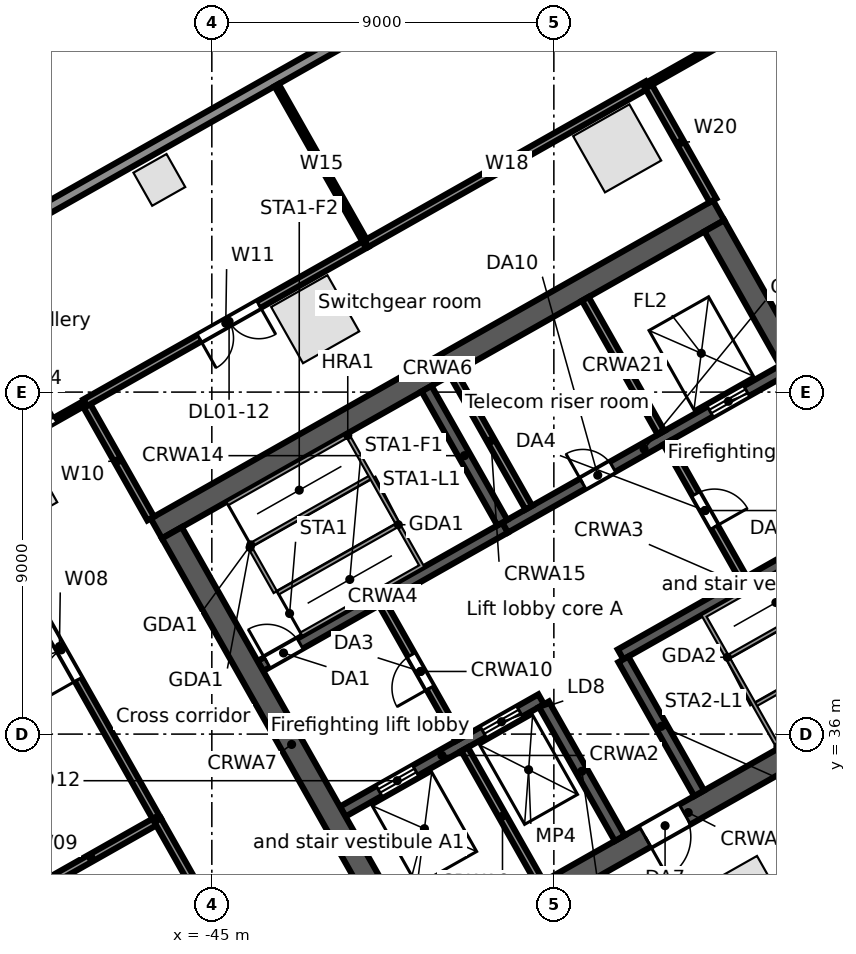
"""IFC4 building model, lengths in metres.
Left out: names, types, materials, properties, quantities, classifications, styles, units other than length and angle.
Written with IfcOpenShell. Run it as: python <this file> out.ifc"""

import sys

from ifc_helpers import new_model, si_unit, direction, frame, frame_2d, origin, origin_2d, place, context, subcontext, project, spatial, rectangle, extrude, element, fill, save


model = new_model("IFC4")
c1 = context("Model", 3, precision=1e-05, world=origin(), true_north=direction((0.0, 1.0)))
c2 = subcontext(c1, "Body", "Model", "MODEL_VIEW")
j1 = project(units=[si_unit("LENGTHUNIT", "METRE"), si_unit("PLANEANGLEUNIT", "RADIAN")], contexts=[c1])
p1 = place(None, origin())
s1 = spatial("IfcSite", under=j1, at=p1, CompositionType="ELEMENT")
p2 = place(p1, origin())
s2 = spatial("IfcBuilding", under=s1, at=p2, CompositionType="ELEMENT")
p3 = place(p2, frame((0.0, 0.0, 6.5)))
s3 = spatial("IfcBuildingStorey", under=s2, at=p3, CompositionType="ELEMENT", Elevation=6.5)
for number, where, z_axis, x_axis in (
    (1, (-34.334, 51.414, 0.0), (0.0, 0.0, 1.0), (-0.87, -0.492, 0.0)),
    (2, (-42.28, 46.919, 0.0), (0.0, 0.0, 1.0), (-0.87, -0.492, 0.0)),
    (3, (-50.226, 42.423, 0.0), (0.0, 0.0, 1.0), (-0.87, -0.492, 0.0)),
    (4, (-30.976, 31.635, 0.0), (0.0, 0.0, 1.0), (0.87, 0.492, 0.0)),
):
    element("IfcColumn", number, at=place(p3, frame(where, z_axis=z_axis, x_axis=x_axis)), inside=s3, PredefinedType="COLUMN", context=c2, shape_type="SweptSolid", body=[
        extrude(rectangle(XDim=1.7, YDim=1.7, at=origin_2d()), origin(), (0.0, 0.0, 1.0), 5.0),
    ])
p4 = place(p3, frame((-46.381, 50.584, 0.0), z_axis=(0.0, 0.0, 1.0), x_axis=(-0.87035569594, -0.492423560103, 0.0)))
e5 = element("IfcColumn", 5, at=p4, inside=s3, PredefinedType="COLUMN", context=c2, shape_type="SweptSolid", body=[
    extrude(rectangle(XDim=1.0, YDim=1.0, at=origin_2d()), origin(), (0.0, 0.0, 1.0), 5.0),
])
p5 = place(p3, frame((-63.707, 41.701, 0.0), z_axis=(0.0, 0.0, 1.0), x_axis=(0.870355510268, 0.492423888277, 0.0)))
e6 = element("IfcWall", 6, at=p5, inside=s3, PredefinedType="STANDARD", context=c2, shape_type="SweptSolid", body=[
    extrude(rectangle(XDim=67.903, YDim=0.3, at=frame_2d((33.952, 0.0))), origin(), (0.0, 0.0, 1.0), 4.65),
])
p6 = place(p3, frame((-45.526, 21.522, 0.0), z_axis=(0.0, 0.0, 1.0), x_axis=(-0.857164837164, 0.515042174903, 0.0)))
e7 = element("IfcWall", 7, at=p6, inside=s3, PredefinedType="STANDARD", context=c2, shape_type="SweptSolid", body=[
    extrude(rectangle(XDim=21.35, YDim=0.3, at=frame_2d((10.675, 0.0))), origin(), (0.0, 0.0, 1.0), 4.65),
])
p7 = place(p3, frame((-39.862, 29.749, 0.0), z_axis=(0.0, 0.0, 1.0), x_axis=(0.870350116061, 0.492433422375, 0.0)))
e8 = element("IfcWall", 8, at=p7, inside=s3, PredefinedType="SOLIDWALL", context=c2, shape_type="SweptSolid", body=[
    extrude(rectangle(XDim=17.0, YDim=0.6, at=frame_2d((8.5, 0.0))), origin(), (0.0, 0.0, 1.0), 4.65),
])
p8 = place(p7, frame((7.2, 0.0, 0.0)))
e9 = element("IfcOpeningElement", 9, at=p8, cuts=e8, PredefinedType="OPENING", context=c2, shape_type="SweptSolid", body=[
    extrude(rectangle(XDim=1.2, YDim=2.1, at=frame_2d((0.6, 1.05))), frame((0.0, 0.31, 0.0), z_axis=(0.0, -1.0, 0.0), x_axis=(1.0, 0.0, 0.0)), (0.0, 0.0, 1.0), 0.62),
])
p9 = place(p3, frame((-41.556, 33.961, 0.0), z_axis=(0.0, 0.0, 1.0), x_axis=(0.870343731308, 0.492444706919, 0.0)))
e10 = element("IfcWall", 10, at=p9, inside=s3, PredefinedType="SOLIDWALL", context=c2, shape_type="SweptSolid", body=[
    extrude(rectangle(XDim=6.0, YDim=0.3, at=frame_2d((3.0, 0.0))), origin(), (0.0, 0.0, 1.0), 4.65),
])
p10 = place(p9, frame((1.1, 0.0, 0.0)))
e11 = element("IfcOpeningElement", 11, at=p10, cuts=e10, PredefinedType="OPENING", context=c2, shape_type="SweptSolid", body=[
    extrude(rectangle(XDim=1.1, YDim=2.1, at=frame_2d((0.55, 1.05))), frame((0.0, 0.16, 0.0), z_axis=(0.0, -1.0, 0.0), x_axis=(1.0, 0.0, 0.0)), (0.0, 0.0, 1.0), 0.32),
])
p11 = place(p9, frame((4.25, 0.0, 0.0)))
e12 = element("IfcOpeningElement", 12, at=p11, cuts=e10, PredefinedType="OPENING", context=c2, shape_type="SweptSolid", body=[
    extrude(rectangle(XDim=1.1, YDim=2.1, at=frame_2d((0.55, 1.05))), frame((0.0, 0.16, 0.0), z_axis=(0.0, -1.0, 0.0), x_axis=(1.0, 0.0, 0.0)), (0.0, 0.0, 1.0), 0.32),
])
p12 = place(p3, frame((-34.245, 38.097, 0.0), z_axis=(0.0, 0.0, 1.0), x_axis=(0.870364910201, 0.492407273597, 0.0)))
e13 = element("IfcWall", 13, at=p12, inside=s3, PredefinedType="SOLIDWALL", context=c2, shape_type="SweptSolid", body=[
    extrude(rectangle(XDim=7.4, YDim=0.3, at=frame_2d((3.7, 0.0))), origin(), (0.0, 0.0, 1.0), 4.65),
])
p13 = place(p12, frame((6.2, 0.0, 0.0)))
e14 = element("IfcOpeningElement", 14, at=p13, cuts=e13, PredefinedType="OPENING", context=c2, shape_type="SweptSolid", body=[
    extrude(rectangle(XDim=1.0, YDim=2.1, at=frame_2d((0.5, 1.05))), frame((0.0, 0.16, 0.0), z_axis=(0.0, -1.0, 0.0), x_axis=(1.0, 0.0, 0.0)), (0.0, 0.0, 1.0), 0.32),
])
p14 = place(p3, frame((-43.723, 37.791, 0.0), z_axis=(0.0, 0.0, 1.0), x_axis=(0.87035077051, 0.49243226567, 0.0)))
e15 = element("IfcWall", 15, at=p14, inside=s3, PredefinedType="SOLIDWALL", context=c2, shape_type="SweptSolid", body=[
    extrude(rectangle(XDim=7.4, YDim=0.3, at=frame_2d((3.7, 0.0))), origin(), (0.0, 0.0, 1.0), 4.65),
])
p15 = place(p14, frame((0.2, 0.0, 0.0)))
e16 = element("IfcOpeningElement", 16, at=p15, cuts=e15, PredefinedType="OPENING", context=c2, shape_type="SweptSolid", body=[
    extrude(rectangle(XDim=1.0, YDim=2.1, at=frame_2d((0.5, 1.05))), frame((0.0, 0.16, 0.0), z_axis=(0.0, -1.0, 0.0), x_axis=(1.0, 0.0, 0.0)), (0.0, 0.0, 1.0), 0.32),
])
p16 = place(p3, frame((-37.282, 41.435, 0.0), z_axis=(0.0, 0.0, 1.0), x_axis=(0.870356516133, 0.492422110414, 0.0)))
e17 = element("IfcWall", 17, at=p16, inside=s3, PredefinedType="SOLIDWALL", context=c2, shape_type="SweptSolid", body=[
    extrude(rectangle(XDim=8.4, YDim=0.3, at=frame_2d((4.2, 0.0))), origin(), (0.0, 0.0, 1.0), 4.65),
])
p17 = place(p16, frame((6.2, 0.0, 0.0)))
e18 = element("IfcOpeningElement", 18, at=p17, cuts=e17, PredefinedType="OPENING", context=c2, shape_type="SweptSolid", body=[
    extrude(rectangle(XDim=1.1, YDim=2.1, at=frame_2d((0.55, 1.05))), frame((0.0, 0.16, 0.0), z_axis=(0.0, -1.0, 0.0), x_axis=(1.0, 0.0, 0.0)), (0.0, 0.0, 1.0), 0.32),
])
p18 = place(p16, frame((2.35, 0.0, 0.0)))
e19 = element("IfcOpeningElement", 19, at=p18, cuts=e17, PredefinedType="OPENING", context=c2, shape_type="SweptSolid", body=[
    extrude(rectangle(XDim=0.9, YDim=2.1, at=frame_2d((0.45, 1.05))), frame((0.0, 0.16, 0.0), z_axis=(0.0, -1.0, 0.0), x_axis=(1.0, 0.0, 0.0)), (0.0, 0.0, 1.0), 0.32),
])
p19 = place(p3, frame((-46.461, 41.412, 0.0), z_axis=(0.0, 0.0, 1.0), x_axis=(0.870350116061, 0.492433422375, 0.0)))
e20 = element("IfcWall", 20, at=p19, inside=s3, PredefinedType="SOLIDWALL", context=c2, shape_type="SweptSolid", body=[
    extrude(rectangle(XDim=17.0, YDim=0.6, at=frame_2d((8.5, 0.0))), origin(), (0.0, 0.0, 1.0), 4.65),
])
p20 = place(p3, frame((-46.052, 41.298, 0.0), z_axis=(0.0, 0.0, 1.0), x_axis=(0.492418598281, -0.870358503186, 0.0)))
e21 = element("IfcWall", 21, at=p20, inside=s3, PredefinedType="SOLIDWALL", context=c2, shape_type="SweptSolid", body=[
    extrude(rectangle(XDim=12.8, YDim=0.6, at=frame_2d((6.4, 0.0))), origin(), (0.0, 0.0, 1.0), 4.65),
])
p21 = place(p3, frame((-38.349, 35.603, 0.0), z_axis=(0.0, 0.0, 1.0), x_axis=(0.49241474071, -0.870360685654, 0.0)))
e22 = element("IfcWall", 22, at=p21, inside=s3, PredefinedType="SOLIDWALL", context=c2, shape_type="SweptSolid", body=[
    extrude(rectangle(XDim=4.05, YDim=0.2, at=frame_2d((2.025, 0.0))), origin(), (0.0, 0.0, 1.0), 4.65),
])
p22 = place(p3, frame((-40.516, 39.433, 0.0), z_axis=(0.0, 0.0, 1.0), x_axis=(0.492453559952, -0.87033872216, 0.0)))
e23 = element("IfcWall", 23, at=p22, inside=s3, PredefinedType="PARTITIONING", context=c2, shape_type="SweptSolid", body=[
    extrude(rectangle(XDim=4.1, YDim=0.2, at=frame_2d((2.05, 0.0))), origin(), (0.0, 0.0, 1.0), 4.65),
])
p23 = place(p22, frame((1.55, 0.0, 0.0)))
e24 = element("IfcOpeningElement", 24, at=p23, cuts=e23, PredefinedType="OPENING", context=c2, shape_type="SweptSolid", body=[
    extrude(rectangle(XDim=1.0, YDim=2.1, at=frame_2d((0.5, 1.05))), frame((0.0, 0.11, 0.0), z_axis=(0.0, -1.0, 0.0), x_axis=(1.0, 0.0, 0.0)), (0.0, 0.0, 1.0), 0.22),
])
p24 = place(p3, frame((-36.26, 36.785, 0.0), z_axis=(0.0, 0.0, 1.0), x_axis=(0.492440575896, -0.870346068648, 0.0)))
e25 = element("IfcWall", 25, at=p24, inside=s3, PredefinedType="SOLIDWALL", context=c2, shape_type="SweptSolid", body=[
    extrude(rectangle(XDim=4.05, YDim=0.3, at=frame_2d((2.025, 0.0))), origin(), (0.0, 0.0, 1.0), 4.65),
])
p25 = place(p3, frame((-39.35, 45.09, 0.0), z_axis=(0.0, 0.0, 1.0), x_axis=(0.49241474071, -0.870360685654, 0.0)))
e26 = element("IfcWall", 26, at=p25, inside=s3, PredefinedType="SOLIDWALL", context=c2, shape_type="SweptSolid", body=[
    extrude(rectangle(XDim=4.05, YDim=0.3, at=frame_2d((2.025, 0.0))), origin(), (0.0, 0.0, 1.0), 4.65),
])
p26 = place(p3, frame((-38.654, 45.484, 0.0), z_axis=(0.0, 0.0, 1.0), x_axis=(0.492440575896, -0.870346068648, 0.0)))
e27 = element("IfcWall", 27, at=p26, inside=s3, PredefinedType="SOLIDWALL", context=c2, shape_type="SweptSolid", body=[
    extrude(rectangle(XDim=4.05, YDim=0.2, at=frame_2d((2.025, 0.0))), origin(), (0.0, 0.0, 1.0), 4.65),
])
p27 = place(p3, frame((-34.171, 37.967, 0.0), z_axis=(0.0, 0.0, 1.0), x_axis=(0.492394910396, -0.870371904542, 0.0)))
e28 = element("IfcWall", 28, at=p27, inside=s3, PredefinedType="SOLIDWALL", context=c2, shape_type="SweptSolid", body=[
    extrude(rectangle(XDim=4.05, YDim=0.3, at=frame_2d((2.025, 0.0))), origin(), (0.0, 0.0, 1.0), 4.65),
])
p28 = place(p3, frame((-33.031, 43.667, 0.0), z_axis=(0.0, 0.0, 1.0), x_axis=(0.492408451753, -0.87036424366, 0.0)))
e29 = element("IfcWall", 29, at=p28, inside=s3, PredefinedType="PARTITIONING", context=c2, shape_type="SweptSolid", body=[
    extrude(rectangle(XDim=4.1, YDim=0.2, at=frame_2d((2.05, 0.0))), origin(), (0.0, 0.0, 1.0), 4.65),
])
p29 = place(p28, frame((1.55, 0.0, 0.0)))
e30 = element("IfcOpeningElement", 30, at=p29, cuts=e29, PredefinedType="OPENING", context=c2, shape_type="SweptSolid", body=[
    extrude(rectangle(XDim=1.0, YDim=2.1, at=frame_2d((0.5, 1.05))), frame((0.0, 0.11, 0.0), z_axis=(0.0, -1.0, 0.0), x_axis=(1.0, 0.0, 0.0)), (0.0, 0.0, 1.0), 0.22),
])
p30 = place(p3, frame((-35.173, 47.454, 0.0), z_axis=(0.0, 0.0, 1.0), x_axis=(0.492440575896, -0.870346068648, 0.0)))
e31 = element("IfcWall", 31, at=p30, inside=s3, PredefinedType="SOLIDWALL", context=c2, shape_type="SweptSolid", body=[
    extrude(rectangle(XDim=4.05, YDim=0.2, at=frame_2d((2.025, 0.0))), origin(), (0.0, 0.0, 1.0), 4.65),
])
p31 = place(p3, frame((-31.778, 49.374, 0.0), z_axis=(0.0, 0.0, 1.0), x_axis=(0.492433046652, -0.870350328641, 0.0)))
e32 = element("IfcWall", 32, at=p31, inside=s3, PredefinedType="SOLIDWALL", context=c2, shape_type="SweptSolid", body=[
    extrude(rectangle(XDim=12.8, YDim=0.6, at=frame_2d((6.4, 0.0))), origin(), (0.0, 0.0, 1.0), 4.65),
])
p32 = place(p3, frame((-51.596, 42.873, 0.0), z_axis=(0.0, 0.0, 1.0), x_axis=(0.87043427122, 0.492284652905, 0.0)))
e33 = element("IfcWall", 33, at=p32, inside=s3, PredefinedType="PARTITIONING", context=c2, shape_type="SweptSolid", body=[
    extrude(rectangle(XDim=3.75, YDim=0.125, at=frame_2d((1.875, 0.0))), origin(), (0.0, 0.0, 1.0), 4.65),
])
p33 = place(p32, frame((1.95, 0.0, 0.0)))
e34 = element("IfcOpeningElement", 34, at=p33, cuts=e33, PredefinedType="OPENING", context=c2, shape_type="SweptSolid", body=[
    extrude(rectangle(XDim=0.9, YDim=2.1, at=frame_2d((0.45, 1.05))), frame((0.0, 0.073, 0.0), z_axis=(0.0, -1.0, 0.0), x_axis=(1.0, 0.0, 0.0)), (0.0, 0.0, 1.0), 0.145),
])
p34 = place(p3, frame((-51.596, 42.873, 0.0), z_axis=(0.0, 0.0, 1.0), x_axis=(0.492438738815, -0.870347108064, 0.0)))
e35 = element("IfcWall", 35, at=p34, inside=s3, PredefinedType="PARTITIONING", context=c2, shape_type="SweptSolid", body=[
    extrude(rectangle(XDim=10.5, YDim=0.2, at=frame_2d((5.25, 0.0))), origin(), (0.0, 0.0, 1.0), 3.712),
])
p35 = place(p34, frame((4.45, 0.0, 0.0)))
e36 = element("IfcOpeningElement", 36, at=p35, cuts=e35, PredefinedType="OPENING", context=c2, shape_type="SweptSolid", body=[
    extrude(rectangle(XDim=1.8, YDim=2.1, at=frame_2d((0.9, 1.05))), frame((0.0, 0.11, 0.0), z_axis=(0.0, -1.0, 0.0), x_axis=(1.0, 0.0, 0.0)), (0.0, 0.0, 1.0), 0.22),
])
p36 = place(p3, frame((-49.928, 31.752, 0.0), z_axis=(0.0, 0.0, 1.0), x_axis=(0.870348099826, 0.492436985948, 0.0)))
e37 = element("IfcWall", 37, at=p36, inside=s3, PredefinedType="PARTITIONING", context=c2, shape_type="SweptSolid", body=[
    extrude(rectangle(XDim=4.025, YDim=0.2, at=frame_2d((2.012, 0.0))), origin(), (0.0, 0.0, 1.0), 4.65),
])
p37 = place(p3, frame((-48.332, 44.719, 0.0), z_axis=(0.0, 0.0, 1.0), x_axis=(0.492392845909, -0.87037307248, 0.0)))
e38 = element("IfcWall", 38, at=p37, inside=s3, PredefinedType="PARTITIONING", context=c2, shape_type="SweptSolid", body=[
    extrude(rectangle(XDim=3.5, YDim=0.2, at=frame_2d((1.75, 0.0))), origin(), (0.0, 0.0, 1.0), 3.93),
])
p38 = place(p3, frame((-48.332, 44.719, 0.0), z_axis=(0.0, 0.0, 1.0), x_axis=(0.870331650579, 0.492466057713, 0.0)))
e39 = element("IfcWall", 39, at=p38, inside=s3, PredefinedType="PARTITIONING", context=c2, shape_type="SweptSolid", body=[
    extrude(rectangle(XDim=8.5, YDim=0.2, at=frame_2d((4.25, 0.0))), origin(), (0.0, 0.0, 1.0), 4.03),
])
p39 = place(p38, frame((3.45, 0.0, 0.0)))
e40 = element("IfcOpeningElement", 40, at=p39, cuts=e39, PredefinedType="OPENING", context=c2, shape_type="SweptSolid", body=[
    extrude(rectangle(XDim=1.8, YDim=2.1, at=frame_2d((0.9, 1.05))), frame((0.0, 0.11, 0.0), z_axis=(0.0, -1.0, 0.0), x_axis=(1.0, 0.0, 0.0)), (0.0, 0.0, 1.0), 0.22),
])
p40 = place(p3, frame((-46.425, 33.734, 0.0), z_axis=(0.0, 0.0, 1.0), x_axis=(0.492427267353, -0.870353598469, 0.0)))
e41 = element("IfcWall", 41, at=p40, inside=s3, PredefinedType="PARTITIONING", context=c2, shape_type="SweptSolid", body=[
    extrude(rectangle(XDim=5.0, YDim=0.2, at=frame_2d((2.5, 0.0))), origin(), (0.0, 0.0, 1.0), 4.65),
])
p41 = place(p3, frame((-43.295, 53.077, 0.0), z_axis=(0.0, 0.0, 1.0), x_axis=(0.492503605136, -0.87031040378, 0.0)))
e42 = element("IfcWall", 42, at=p41, inside=s3, PredefinedType="PARTITIONING", context=c2, shape_type="SweptSolid", body=[
    extrude(rectangle(XDim=4.793, YDim=0.125, at=frame_2d((2.397, 0.0))), origin(), (0.0, 0.0, 1.0), 3.93),
])
p42 = place(p3, frame((-40.934, 48.905, 0.0), z_axis=(0.0, 0.0, 1.0), x_axis=(0.870387854278, 0.492366716102, 0.0)))
e43 = element("IfcWall", 43, at=p42, inside=s3, PredefinedType="PARTITIONING", context=c2, shape_type="SweptSolid", body=[
    extrude(rectangle(XDim=8.5, YDim=0.2, at=frame_2d((4.25, 0.0))), origin(), (0.0, 0.0, 1.0), 4.03),
])
p43 = place(p3, frame((-33.536, 53.09, 0.0), z_axis=(0.0, 0.0, 1.0), x_axis=(0.492521469645, -0.870300294116, 0.0)))
e44 = element("IfcWall", 44, at=p43, inside=s3, PredefinedType="PARTITIONING", context=c2, shape_type="SweptSolid", body=[
    extrude(rectangle(XDim=3.5, YDim=0.2, at=frame_2d((1.75, 0.0))), origin(), (0.0, 0.0, 1.0), 3.93),
])
p44 = place(p3, frame((-33.536, 53.09, 0.0), z_axis=(0.0, 0.0, 1.0), x_axis=(0.870327439455, 0.492473499928, 0.0)))
e45 = element("IfcWall", 45, at=p44, inside=s3, PredefinedType="PARTITIONING", context=c2, shape_type="SweptSolid", body=[
    extrude(rectangle(XDim=8.0, YDim=0.125, at=frame_2d((4.0, 0.0))), origin(), (0.0, 0.0, 1.0), 3.712),
])
p45 = place(p44, frame((3.45, 0.0, 0.0)))
e46 = element("IfcOpeningElement", 46, at=p45, cuts=e45, PredefinedType="OPENING", context=c2, shape_type="SweptSolid", body=[
    extrude(rectangle(XDim=0.9, YDim=2.1, at=frame_2d((0.45, 1.05))), frame((0.0, 0.073, 0.0), z_axis=(0.0, -1.0, 0.0), x_axis=(1.0, 0.0, 0.0)), (0.0, 0.0, 1.0), 0.145),
])
p46 = place(p17, origin())
e47 = element("IfcDoor", 47, at=p46, inside=s3, OperationType="DOUBLE_DOOR_SLIDING", PredefinedType="DOOR", context=c2, shape_type="SweptSolid", body=[
    extrude(rectangle(XDim=1.1, YDim=2.1, at=frame_2d((0.55, 1.05))), frame((0.0, 0.025, 0.0), z_axis=(0.0, -1.0, 0.0), x_axis=(1.0, 0.0, 0.0)), (0.0, 0.0, 1.0), 0.05),
])
fill(e18, e47)
p47 = place(p10, origin())
e48 = element("IfcDoor", 48, at=p47, inside=s3, OperationType="DOUBLE_DOOR_SLIDING", PredefinedType="DOOR", context=c2, shape_type="SweptSolid", body=[
    extrude(rectangle(XDim=1.1, YDim=2.1, at=frame_2d((0.55, 1.05))), frame((0.0, 0.025, 0.0), z_axis=(0.0, -1.0, 0.0), x_axis=(1.0, 0.0, 0.0)), (0.0, 0.0, 1.0), 0.05),
])
fill(e11, e48)
p48 = place(p11, origin())
e49 = element("IfcDoor", 49, at=p48, inside=s3, OperationType="DOUBLE_DOOR_SLIDING", PredefinedType="DOOR", context=c2, shape_type="SweptSolid", body=[
    extrude(rectangle(XDim=1.1, YDim=2.1, at=frame_2d((0.55, 1.05))), frame((0.0, 0.025, 0.0), z_axis=(0.0, -1.0, 0.0), x_axis=(1.0, 0.0, 0.0)), (0.0, 0.0, 1.0), 0.05),
])
fill(e12, e49)
p49 = place(p15, origin())
e50 = element("IfcDoor", 50, at=p49, inside=s3, OperationType="SINGLE_SWING_LEFT", PredefinedType="DOOR", context=c2, shape_type="SweptSolid", body=[
    extrude(rectangle(XDim=1.0, YDim=2.1, at=frame_2d((0.5, 1.05))), frame((0.0, 0.025, 0.0), z_axis=(0.0, -1.0, 0.0), x_axis=(1.0, 0.0, 0.0)), (0.0, 0.0, 1.0), 0.05),
])
fill(e16, e50)
p50 = place(p23, frame((1.0, 0.0, 0.0), z_axis=(0.0, 0.0, 1.0), x_axis=(-1.0, 0.0, 0.0)))
e51 = element("IfcDoor", 51, at=p50, inside=s3, OperationType="SINGLE_SWING_LEFT", PredefinedType="DOOR", context=c2, shape_type="SweptSolid", body=[
    extrude(rectangle(XDim=1.0, YDim=2.1, at=frame_2d((0.5, 1.05))), frame((0.0, 0.025, 0.0), z_axis=(0.0, -1.0, 0.0), x_axis=(1.0, 0.0, 0.0)), (0.0, 0.0, 1.0), 0.05),
])
fill(e24, e51)
p51 = place(p29, origin())
e52 = element("IfcDoor", 52, at=p51, inside=s3, OperationType="SINGLE_SWING_RIGHT", PredefinedType="DOOR", context=c2, shape_type="SweptSolid", body=[
    extrude(rectangle(XDim=1.0, YDim=2.1, at=frame_2d((0.5, 1.05))), frame((0.0, 0.025, 0.0), z_axis=(0.0, -1.0, 0.0), x_axis=(1.0, 0.0, 0.0)), (0.0, 0.0, 1.0), 0.05),
])
fill(e30, e52)
p52 = place(p8, frame((1.2, 0.0, 0.0), z_axis=(0.0, 0.0, 1.0), x_axis=(-1.0, 0.0, 0.0)))
e53 = element("IfcDoor", 53, at=p52, inside=s3, OperationType="SINGLE_SWING_RIGHT", PredefinedType="DOOR", context=c2, shape_type="SweptSolid", body=[
    extrude(rectangle(XDim=1.2, YDim=2.1, at=frame_2d((0.6, 1.05))), frame((0.0, 0.025, 0.0), z_axis=(0.0, -1.0, 0.0), x_axis=(1.0, 0.0, 0.0)), (0.0, 0.0, 1.0), 0.05),
])
fill(e9, e53)
p53 = place(p18, origin())
e54 = element("IfcDoor", 54, at=p53, inside=s3, OperationType="SINGLE_SWING_LEFT", PredefinedType="DOOR", context=c2, shape_type="SweptSolid", body=[
    extrude(rectangle(XDim=0.9, YDim=2.1, at=frame_2d((0.45, 1.05))), frame((0.0, 0.025, 0.0), z_axis=(0.0, -1.0, 0.0), x_axis=(1.0, 0.0, 0.0)), (0.0, 0.0, 1.0), 0.05),
])
fill(e19, e54)
p54 = place(p33, origin())
e55 = element("IfcDoor", 55, at=p54, inside=s3, OperationType="SINGLE_SWING_RIGHT", PredefinedType="DOOR", context=c2, shape_type="SweptSolid", body=[
    extrude(rectangle(XDim=0.9, YDim=2.1, at=frame_2d((0.45, 1.05))), frame((0.0, 0.025, 0.0), z_axis=(0.0, -1.0, 0.0), x_axis=(1.0, 0.0, 0.0)), (0.0, 0.0, 1.0), 0.05),
])
fill(e34, e55)
p55 = place(p35, frame((1.8, 0.0, 0.0), z_axis=(0.0, 0.0, 1.0), x_axis=(-1.0, 0.0, 0.0)))
e56 = element("IfcDoor", 56, at=p55, inside=s3, OperationType="DOUBLE_DOOR_SINGLE_SWING", PredefinedType="DOOR", context=c2, shape_type="SweptSolid", body=[
    extrude(rectangle(XDim=1.8, YDim=2.1, at=frame_2d((0.9, 1.05))), frame((0.0, 0.025, 0.0), z_axis=(0.0, -1.0, 0.0), x_axis=(1.0, 0.0, 0.0)), (0.0, 0.0, 1.0), 0.05),
])
fill(e36, e56)
p56 = place(p39, frame((1.8, 0.0, 0.0), z_axis=(0.0, 0.0, 1.0), x_axis=(-1.0, 0.0, 0.0)))
e57 = element("IfcDoor", 57, at=p56, inside=s3, OperationType="DOUBLE_DOOR_SINGLE_SWING", PredefinedType="DOOR", context=c2, shape_type="SweptSolid", body=[
    extrude(rectangle(XDim=1.8, YDim=2.1, at=frame_2d((0.9, 1.05))), frame((0.0, 0.025, 0.0), z_axis=(0.0, -1.0, 0.0), x_axis=(1.0, 0.0, 0.0)), (0.0, 0.0, 1.0), 0.05),
])
fill(e40, e57)
save(model, sys.argv[1])
